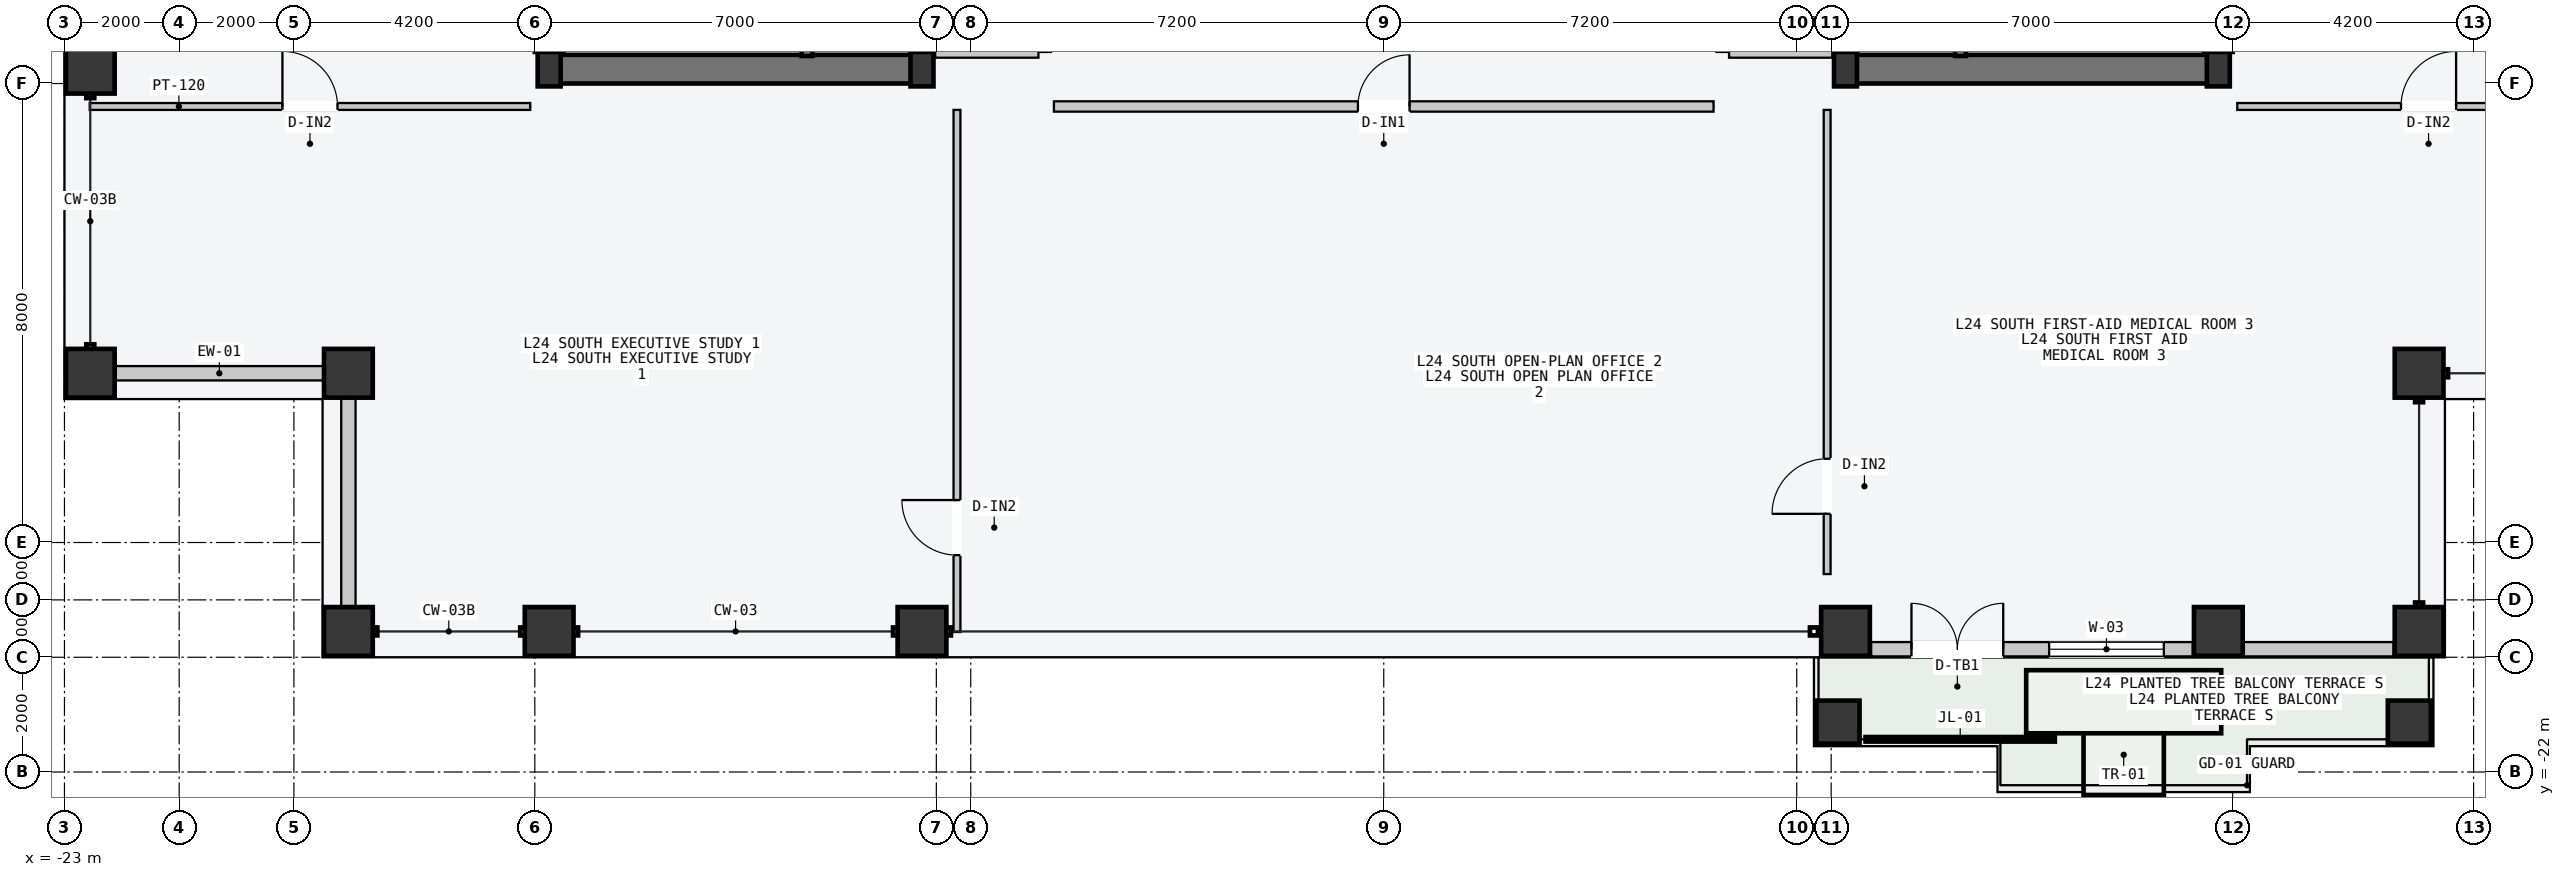
"""IFC4 building model, lengths in metres.
Left out: names, types, materials, properties, quantities, classifications, styles, units other than length and angle.
Written with IfcOpenShell. Run it as: python <this file> out.ifc"""

import sys

from ifc_helpers import new_model, si_unit, direction, frame, frame_2d, origin, origin_2d, place, context, subcontext, project, spatial, rectangle, hollow_rectangle, i_section, extrude, element, fill, save


model = new_model("IFC4")
c1 = context("Model", 3, precision=1e-05, world=origin(), true_north=direction((0.0, 1.0)))
c2 = subcontext(c1, "Body", "Model", "MODEL_VIEW")
j1 = project(units=[si_unit("LENGTHUNIT", "METRE"), si_unit("PLANEANGLEUNIT", "RADIAN")], contexts=[c1])
p1 = place(None, origin())
s1 = spatial("IfcSite", under=j1, at=p1, CompositionType="ELEMENT")
p2 = place(p1, origin())
s2 = spatial("IfcBuilding", under=s1, at=p2, CompositionType="ELEMENT")
p3 = place(p2, frame((0.0, 0.0, 95.4)))
s3 = spatial("IfcBuildingStorey", under=s2, at=p3, CompositionType="ELEMENT", Elevation=95.4)
for number, where, z_axis, x_axis in (
    (1, (-14.53, -9.75, -0.2), (0.0, 0.0, 1.0), (1.0, 0.0, 0.0)),
    (2, (8.07, -9.75, -0.2), (0.0, 0.0, 1.0), (1.0, 0.0, 0.0)),
):
    element("IfcWall", number, at=place(p3, frame(where, z_axis=z_axis, x_axis=x_axis)), inside=s3, PredefinedType="SHEAR", context=c2, shape_type="SweptSolid", body=[
        extrude(rectangle(XDim=6.46, YDim=0.5, at=frame_2d((3.23, 0.0))), origin(), (0.0, 0.0, 1.0), 3.6),
    ])
for number, where, z_axis, x_axis in (
    (3, (-14.55, -9.75, 0.0), (0.0, 0.0, 1.0), (1.0, 0.0, 0.0)),
    (4, (-8.05, -9.75, 0.0), (0.0, 0.0, 1.0), (1.0, 0.0, 0.0)),
    (5, (8.05, -9.75, 0.0), (0.0, 0.0, 1.0), (1.0, 0.0, 0.0)),
    (6, (14.55, -9.75, 0.0), (0.0, 0.0, 1.0), (1.0, 0.0, 0.0)),
):
    element("IfcColumn", number, at=place(p3, frame(where, z_axis=z_axis, x_axis=x_axis)), inside=s3, PredefinedType="COLUMN", context=c2, shape_type="SweptSolid", body=[
        extrude(i_section(OverallWidth=0.4, OverallDepth=0.6, WebThickness=0.022, FlangeThickness=0.036, at=origin_2d()), origin(), (0.0, 0.0, 1.0), 3.6),
    ])
for number, where, z_axis, x_axis in (
    (7, (-18.05, -19.55, 0.0), (0.0, 0.0, 1.0), (1.0, 0.0, 0.0)),
    (8, (-14.55, -19.55, 0.0), (0.0, 0.0, 1.0), (1.0, 0.0, 0.0)),
    (9, (-8.05, -19.55, 0.0), (0.0, 0.0, 1.0), (1.0, 0.0, 0.0)),
    (10, (8.05, -19.55, 0.0), (0.0, 0.0, 1.0), (1.0, 0.0, 0.0)),
    (11, (14.55, -19.55, 0.0), (0.0, 0.0, 1.0), (1.0, 0.0, 0.0)),
    (12, (18.05, -19.55, 0.0), (0.0, 0.0, 1.0), (1.0, 0.0, 0.0)),
    (13, (-22.55, -15.05, 0.0), (0.0, 0.0, 1.0), (0.0, 1.0, 0.0)),
    (14, (-22.55, -9.75, 0.0), (0.0, 0.0, 1.0), (0.0, 1.0, 0.0)),
    (15, (18.05, -15.05, 0.0), (0.0, 0.0, 1.0), (1.0, 0.0, 0.0)),
    (16, (-18.05, -15.05, 0.0), (0.0, 0.0, 1.0), (1.0, 0.0, 0.0)),
):
    element("IfcColumn", number, at=place(p3, frame(where, z_axis=z_axis, x_axis=x_axis)), inside=s3, PredefinedType="COLUMN", context=c2, shape_type="SweptSolid", body=[
        extrude(hollow_rectangle(XDim=0.85, YDim=0.85, WallThickness=0.04, at=origin_2d()), origin(), (0.0, 0.0, 1.0), 3.6),
    ])
for number, where, z_axis, x_axis in (
    (17, (7.92, -21.13, -0.2), (0.0, 0.0, 1.0), (1.0, 0.0, 0.0)),
    (18, (17.88, -21.13, -0.2), (0.0, 0.0, 1.0), (1.0, 0.0, 0.0)),
):
    element("IfcColumn", number, at=place(p3, frame(where, z_axis=z_axis, x_axis=x_axis)), inside=s3, PredefinedType="COLUMN", context=c2, shape_type="SweptSolid", body=[
        extrude(hollow_rectangle(XDim=0.75, YDim=0.75, WallThickness=0.032, at=origin_2d()), origin(), (0.0, 0.0, 1.0), 3.8),
    ])
p4 = place(p3, frame((8.495, -19.86, 0.0), z_axis=(0.0, 0.0, 1.0), x_axis=(1.0, 0.0, 0.0)))
e19 = element("IfcWall", 19, at=p4, inside=s3, PredefinedType="STANDARD", context=c2, shape_type="SweptSolid", body=[
    extrude(rectangle(XDim=5.61, YDim=0.25, at=frame_2d((2.805, 0.0))), origin(), (0.0, 0.0, 1.0), 3.4),
])
p5 = place(p4, frame((0.705, 0.0, 0.0)))
e20 = element("IfcOpeningElement", 20, at=p5, cuts=e19, PredefinedType="OPENING", context=c2, shape_type="SweptSolid", body=[
    extrude(rectangle(XDim=1.6, YDim=2.2, at=frame_2d((0.8, 1.1))), frame((0.0, 0.135, 0.0), z_axis=(0.0, -1.0, 0.0), x_axis=(1.0, 0.0, 0.0)), (0.0, 0.0, 1.0), 0.27),
])
p6 = place(p4, frame((3.105, 0.0, 0.85)))
e21 = element("IfcOpeningElement", 21, at=p6, cuts=e19, PredefinedType="OPENING", context=c2, shape_type="SweptSolid", body=[
    extrude(rectangle(XDim=2.0, YDim=2.1, at=frame_2d((1.0, 1.05))), frame((0.0, 0.135, 0.0), z_axis=(0.0, -1.0, 0.0), x_axis=(1.0, 0.0, 0.0)), (0.0, 0.0, 1.0), 0.27),
])
p7 = place(p3, frame((14.995, -19.86, 0.0), z_axis=(0.0, 0.0, 1.0), x_axis=(1.0, 0.0, 0.0)))
e22 = element("IfcWall", 22, at=p7, inside=s3, PredefinedType="STANDARD", context=c2, shape_type="SweptSolid", body=[
    extrude(rectangle(XDim=2.61, YDim=0.25, at=frame_2d((1.305, 0.0))), origin(), (0.0, 0.0, 1.0), 3.4),
])
for number, where, z_axis, x_axis in (
    (23, (-22.115, -15.05, 0.0), (0.0, 0.0, 1.0), (1.0, 0.0, 0.0)),
    (24, (-18.05, -19.115, 0.0), (0.0, 0.0, 1.0), (0.0, 1.0, 0.0)),
):
    element("IfcWall", number, at=place(p3, frame(where, z_axis=z_axis, x_axis=x_axis)), inside=s3, PredefinedType="STANDARD", context=c2, shape_type="SweptSolid", body=[
        extrude(rectangle(XDim=3.63, YDim=0.25, at=frame_2d((1.815, 0.0))), origin(), (0.0, 0.0, 1.0), 2.75),
    ])
for number, where, z_axis, x_axis in (
    (25, (-8.045, -9.52, -0.2), (0.0, 0.0, 1.0), (0.0, 1.0, 0.0)),
    (26, (-10.055, -9.52, -0.2), (0.0, 0.0, 1.0), (0.0, 1.0, 0.0)),
    (27, (8.045, -9.52, -0.2), (0.0, 0.0, 1.0), (0.0, 1.0, 0.0)),
    (28, (10.055, -9.52, -0.2), (0.0, 0.0, 1.0), (0.0, 1.0, 0.0)),
):
    element("IfcWall", number, at=place(p3, frame(where, z_axis=z_axis, x_axis=x_axis)), inside=s3, PredefinedType="SOLIDWALL", context=c2, shape_type="SweptSolid", body=[
        extrude(rectangle(XDim=2.12, YDim=0.19, at=frame_2d((1.06, 0.0))), origin(), (0.0, 0.0, 1.0), 3.6),
    ])
for number, where, z_axis, x_axis in (
    (29, (-6.02, -9.45, 0.0), (0.0, 0.0, 1.0), (-1.0, 0.0, 0.0)),
    (30, (6.02, -9.45, 0.0), (0.0, 0.0, 1.0), (1.0, 0.0, 0.0)),
):
    element("IfcWall", number, at=place(p3, frame(where, z_axis=z_axis, x_axis=x_axis)), inside=s3, PredefinedType="PARTITIONING", context=c2, shape_type="SweptSolid", body=[
        extrude(rectangle(XDim=1.8, YDim=0.2, at=frame_2d((0.9, 0.0))), origin(), (0.0, 0.0, 1.0), 3.4),
    ])
p8 = place(p3, frame((-7.44, -19.56, 0.0), z_axis=(0.0, 0.0, 1.0), x_axis=(0.0, 1.0, 0.0)))
e31 = element("IfcWall", 31, at=p8, inside=s3, PredefinedType="PARTITIONING", context=c2, shape_type="SweptSolid", body=[
    extrude(rectangle(XDim=9.1, YDim=0.12, at=frame_2d((4.55, 0.0))), origin(), (0.0, 0.0, 1.0), 3.4),
])
p9 = place(p8, frame((1.34, 0.0, 0.0)))
e32 = element("IfcOpeningElement", 32, at=p9, cuts=e31, PredefinedType="OPENING", context=c2, shape_type="SweptSolid", body=[
    extrude(rectangle(XDim=0.96, YDim=2.18, at=frame_2d((0.48, 1.09))), frame((0.0, 0.07, 0.0), z_axis=(0.0, -1.0, 0.0), x_axis=(1.0, 0.0, 0.0)), (0.0, 0.0, 1.0), 0.14),
])
p10 = place(p3, frame((7.73, -18.55, 0.0), z_axis=(0.0, 0.0, 1.0), x_axis=(0.0, 1.0, 0.0)))
e33 = element("IfcWall", 33, at=p10, inside=s3, PredefinedType="PARTITIONING", context=c2, shape_type="SweptSolid", body=[
    extrude(rectangle(XDim=8.09, YDim=0.12, at=frame_2d((4.045, 0.0))), origin(), (0.0, 0.0, 1.0), 3.4),
])
p11 = place(p10, frame((1.05, 0.0, 0.0)))
e34 = element("IfcOpeningElement", 34, at=p11, cuts=e33, PredefinedType="OPENING", context=c2, shape_type="SweptSolid", body=[
    extrude(rectangle(XDim=0.96, YDim=2.18, at=frame_2d((0.48, 1.09))), frame((0.0, 0.07, 0.0), z_axis=(0.0, -1.0, 0.0), x_axis=(1.0, 0.0, 0.0)), (0.0, 0.0, 1.0), 0.14),
])
p12 = place(p3, frame((-5.75, -10.4, 0.0), z_axis=(0.0, 0.0, 1.0), x_axis=(1.0, 0.0, 0.0)))
e35 = element("IfcWall", 35, at=p12, inside=s3, PredefinedType="PARTITIONING", context=c2, shape_type="SweptSolid", body=[
    extrude(rectangle(XDim=11.5, YDim=0.18, at=frame_2d((5.75, 0.0))), origin(), (0.0, 0.0, 1.0), 3.4),
])
p13 = place(p12, frame((5.3, 0.0, 0.0)))
e36 = element("IfcOpeningElement", 36, at=p13, cuts=e35, PredefinedType="OPENING", context=c2, shape_type="SweptSolid", body=[
    extrude(rectangle(XDim=0.9, YDim=2.15, at=frame_2d((0.45, 1.075))), frame((0.0, 0.1, 0.0), z_axis=(0.0, -1.0, 0.0), x_axis=(1.0, 0.0, 0.0)), (0.0, 0.0, 1.0), 0.2),
])
p14 = place(p3, frame((-22.56, -10.4, 0.0), z_axis=(0.0, 0.0, 1.0), x_axis=(1.0, 0.0, 0.0)))
e37 = element("IfcWall", 37, at=p14, inside=s3, PredefinedType="PARTITIONING", context=c2, shape_type="SweptSolid", body=[
    extrude(rectangle(XDim=7.68, YDim=0.12, at=frame_2d((3.84, 0.0))), origin(), (0.0, 0.0, 1.0), 3.4),
])
p15 = place(p14, frame((3.36, 0.0, 0.0)))
e38 = element("IfcOpeningElement", 38, at=p15, cuts=e37, PredefinedType="OPENING", context=c2, shape_type="SweptSolid", body=[
    extrude(rectangle(XDim=0.96, YDim=2.18, at=frame_2d((0.48, 1.09))), frame((0.0, 0.07, 0.0), z_axis=(0.0, -1.0, 0.0), x_axis=(1.0, 0.0, 0.0)), (0.0, 0.0, 1.0), 0.14),
])
p16 = place(p3, frame((14.88, -10.4, 0.0), z_axis=(0.0, 0.0, 1.0), x_axis=(1.0, 0.0, 0.0)))
e39 = element("IfcWall", 39, at=p16, inside=s3, PredefinedType="PARTITIONING", context=c2, shape_type="SweptSolid", body=[
    extrude(rectangle(XDim=6.67, YDim=0.12, at=frame_2d((3.335, 0.0))), origin(), (0.0, 0.0, 1.0), 3.4),
])
p17 = place(p16, frame((2.855, 0.0, 0.0)))
e40 = element("IfcOpeningElement", 40, at=p17, cuts=e39, PredefinedType="OPENING", context=c2, shape_type="SweptSolid", body=[
    extrude(rectangle(XDim=0.96, YDim=2.18, at=frame_2d((0.48, 1.09))), frame((0.0, 0.07, 0.0), z_axis=(0.0, -1.0, 0.0), x_axis=(1.0, 0.0, 0.0)), (0.0, 0.0, 1.0), 0.14),
])
p18 = place(p5, origin())
e41 = element("IfcDoor", 41, at=p18, inside=s3, OperationType="DOUBLE_DOOR_SINGLE_SWING", PredefinedType="DOOR", context=c2, shape_type="SweptSolid", body=[
    extrude(rectangle(XDim=1.6, YDim=2.2, at=frame_2d((0.8, 1.1))), frame((0.0, 0.025, 0.0), z_axis=(0.0, -1.0, 0.0), x_axis=(1.0, 0.0, 0.0)), (0.0, 0.0, 1.0), 0.05),
])
fill(e20, e41)
p19 = place(p6, origin())
e42 = element("IfcWindow", 42, at=p19, inside=s3, PartitioningType="SINGLE_PANEL", PredefinedType="WINDOW", context=c2, shape_type="SweptSolid", body=[
    extrude(rectangle(XDim=2.0, YDim=2.1, at=frame_2d((1.0, 1.05))), frame((0.0, 0.03, 0.0), z_axis=(0.0, -1.0, 0.0), x_axis=(1.0, 0.0, 0.0)), (0.0, 0.0, 1.0), 0.06),
])
fill(e21, e42)
p20 = place(p9, origin())
e43 = element("IfcDoor", 43, at=p20, inside=s3, OperationType="SINGLE_SWING_RIGHT", PredefinedType="DOOR", context=c2, shape_type="SweptSolid", body=[
    extrude(rectangle(XDim=0.96, YDim=2.18, at=frame_2d((0.48, 1.09))), frame((0.0, 0.025, 0.0), z_axis=(0.0, -1.0, 0.0), x_axis=(1.0, 0.0, 0.0)), (0.0, 0.0, 1.0), 0.05),
])
fill(e32, e43)
p21 = place(p11, origin())
e44 = element("IfcDoor", 44, at=p21, inside=s3, OperationType="SINGLE_SWING_LEFT", PredefinedType="DOOR", context=c2, shape_type="SweptSolid", body=[
    extrude(rectangle(XDim=0.96, YDim=2.18, at=frame_2d((0.48, 1.09))), frame((0.0, 0.025, 0.0), z_axis=(0.0, -1.0, 0.0), x_axis=(1.0, 0.0, 0.0)), (0.0, 0.0, 1.0), 0.05),
])
fill(e34, e44)
p22 = place(p13, origin())
e45 = element("IfcDoor", 45, at=p22, inside=s3, OperationType="SINGLE_SWING_RIGHT", PredefinedType="DOOR", context=c2, shape_type="SweptSolid", body=[
    extrude(rectangle(XDim=0.9, YDim=2.15, at=frame_2d((0.45, 1.075))), frame((0.0, 0.025, 0.0), z_axis=(0.0, -1.0, 0.0), x_axis=(1.0, 0.0, 0.0)), (0.0, 0.0, 1.0), 0.05),
])
fill(e36, e45)
p23 = place(p15, origin())
e46 = element("IfcDoor", 46, at=p23, inside=s3, OperationType="SINGLE_SWING_LEFT", PredefinedType="DOOR", context=c2, shape_type="SweptSolid", body=[
    extrude(rectangle(XDim=0.96, YDim=2.18, at=frame_2d((0.48, 1.09))), frame((0.0, 0.025, 0.0), z_axis=(0.0, -1.0, 0.0), x_axis=(1.0, 0.0, 0.0)), (0.0, 0.0, 1.0), 0.05),
])
fill(e38, e46)
p24 = place(p17, origin())
e47 = element("IfcDoor", 47, at=p24, inside=s3, OperationType="SINGLE_SWING_RIGHT", PredefinedType="DOOR", context=c2, shape_type="SweptSolid", body=[
    extrude(rectangle(XDim=0.96, YDim=2.18, at=frame_2d((0.48, 1.09))), frame((0.0, 0.025, 0.0), z_axis=(0.0, -1.0, 0.0), x_axis=(1.0, 0.0, 0.0)), (0.0, 0.0, 1.0), 0.05),
])
fill(e40, e47)
save(model, sys.argv[1])
